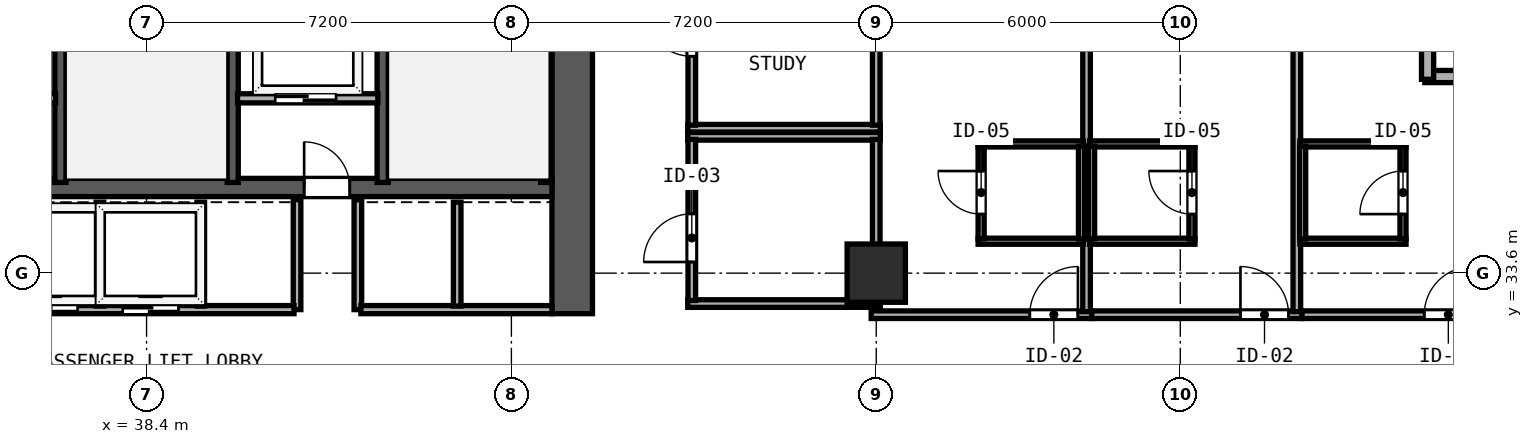
"""IFC4 building model, lengths in metres.
Left out: names, types, materials, properties, quantities, classifications, styles, units other than length and angle.
Written with IfcOpenShell. Run it as: python <this file> out.ifc"""

import sys

from ifc_helpers import new_model, si_unit, direction, frame, frame_2d, origin, origin_2d, place, context, subcontext, project, spatial, rectangle, hollow_rectangle, extrude, element, fill, save


model = new_model("IFC4")
c1 = context("Model", 3, precision=1e-05, world=origin(), true_north=direction((0.0, 1.0)))
c2 = subcontext(c1, "Body", "Model", "MODEL_VIEW")
j1 = project(units=[si_unit("LENGTHUNIT", "METRE"), si_unit("PLANEANGLEUNIT", "RADIAN")], contexts=[c1])
p1 = place(None, origin())
s1 = spatial("IfcSite", under=j1, at=p1, CompositionType="ELEMENT")
p2 = place(p1, origin())
s2 = spatial("IfcBuilding", under=s1, at=p2, CompositionType="ELEMENT")
p3 = place(p2, frame((0.0, 0.0, 81.8)))
s3 = spatial("IfcBuildingStorey", under=s2, at=p3, CompositionType="ELEMENT", Elevation=81.8)
p4 = place(p3, frame((46.8, 32.8, 0.0), z_axis=(0.0, 0.0, 1.0), x_axis=(0.0, 1.0, 0.0)))
e1 = element("IfcWall", 1, at=p4, inside=s3, PredefinedType="SHEAR", context=c2, shape_type="SweptSolid", body=[
    extrude(rectangle(XDim=10.0, YDim=0.8, at=frame_2d((5.0, 0.0))), origin(), (0.0, 0.0, 1.0), 3.6),
])
p5 = place(p3, frame((30.4, 35.29, 0.0), z_axis=(0.0, 0.0, 1.0), x_axis=(1.0, 0.0, 0.0)))
e2 = element("IfcWall", 2, at=p5, inside=s3, PredefinedType="SHEAR", context=c2, shape_type="SweptSolid", body=[
    extrude(rectangle(XDim=16.0, YDim=0.36, at=frame_2d((8.0, 0.0))), origin(), (0.0, 0.0, 1.0), 3.6),
])
p6 = place(p5, frame((4.95, 0.0, 0.0), z_axis=(0.0, 0.0, 1.0), x_axis=(-1.0, 0.0, 0.0)))
e3 = element("IfcOpeningElement", 3, at=p6, cuts=e2, PredefinedType="OPENING", context=c2, shape_type="SweptSolid", body=[
    extrude(rectangle(XDim=0.9, YDim=2.1, at=frame_2d((0.45, 1.05))), frame((0.0, 0.19, 0.0), z_axis=(0.0, -1.0, 0.0), x_axis=(1.0, 0.0, 0.0)), (0.0, 0.0, 1.0), 0.38),
])
p7 = place(p5, frame((12.01, 0.0, 0.0), z_axis=(0.0, 0.0, 1.0), x_axis=(-1.0, 0.0, 0.0)))
e4 = element("IfcOpeningElement", 4, at=p7, cuts=e2, PredefinedType="OPENING", context=c2, shape_type="SweptSolid", body=[
    extrude(rectangle(XDim=0.9, YDim=2.1, at=frame_2d((0.45, 1.05))), frame((0.0, 0.19, 0.0), z_axis=(0.0, -1.0, 0.0), x_axis=(1.0, 0.0, 0.0)), (0.0, 0.0, 1.0), 0.38),
])
for number, where, z_axis, x_axis in (
    (5, (36.7, 35.39, 0.0), (0.0, 0.0, 1.0), (0.0, 1.0, 0.0)),
    (6, (40.1, 35.39, 0.0), (0.0, 0.0, 1.0), (0.0, 1.0, 0.0)),
    (7, (43.06, 35.39, 0.0), (0.0, 0.0, 1.0), (0.0, 1.0, 0.0)),
    (8, (46.288, 35.39, 0.0), (0.0, 0.0, 1.0), (0.0, 1.0, 0.0)),
):
    element("IfcWall", number, at=place(p3, frame(where, z_axis=z_axis, x_axis=x_axis)), inside=s3, PredefinedType="SHEAR", context=c2, shape_type="SweptSolid", body=[
        extrude(rectangle(XDim=7.41, YDim=0.22, at=frame_2d((3.705, 0.0))), origin(), (0.0, 0.0, 1.0), 3.6),
    ])
p8 = place(p3, frame((52.8, 33.6, 0.0), z_axis=(0.0, 0.0, 1.0), x_axis=(1.0, 0.0, 0.0)))
e9 = element("IfcColumn", 9, at=p8, inside=s3, PredefinedType="COLUMN", context=c2, shape_type="SweptSolid", body=[
    extrude(hollow_rectangle(XDim=1.15, YDim=1.15, WallThickness=0.042, at=origin_2d()), origin(), (0.0, 0.0, 1.0), 3.8),
])
p9 = place(p3, frame((64.735, 37.48, 0.0), z_axis=(0.0, 0.0, 1.0), x_axis=(-1.0, 0.0, 0.0)))
e10 = element("IfcWall", 10, at=p9, inside=s3, PredefinedType="SOLIDWALL", context=c2, shape_type="SweptSolid", body=[
    extrude(rectangle(XDim=1.11, YDim=0.24, at=frame_2d((0.555, 0.0))), origin(), (0.0, 0.0, 1.0), 3.6),
])
p10 = place(p3, frame((63.68, 37.425, 0.0), z_axis=(0.0, 0.0, 1.0), x_axis=(0.0, 1.0, 0.0)))
e11 = element("IfcWall", 11, at=p10, inside=s3, PredefinedType="SOLIDWALL", context=c2, shape_type="SweptSolid", body=[
    extrude(rectangle(XDim=1.11, YDim=0.24, at=frame_2d((0.555, 0.0))), origin(), (0.0, 0.0, 1.0), 3.6),
])
p11 = place(p3, frame((33.835, 37.05, 0.0), z_axis=(0.0, 0.0, 1.0), x_axis=(1.0, 0.0, 0.0)))
e12 = element("IfcWall", 12, at=p11, inside=s3, PredefinedType="SOLIDWALL", context=c2, shape_type="SweptSolid", body=[
    extrude(rectangle(XDim=2.77, YDim=0.18, at=frame_2d((1.385, 0.0))), origin(), (0.0, 0.0, 1.0), 3.6),
])
p12 = place(p11, frame((1.945, 0.0, 0.0), z_axis=(0.0, 0.0, 1.0), x_axis=(-1.0, 0.0, 0.0)))
e13 = element("IfcOpeningElement", 13, at=p12, cuts=e12, PredefinedType="OPENING", context=c2, shape_type="SweptSolid", body=[
    extrude(rectangle(XDim=1.2, YDim=2.2, at=frame_2d((0.6, 1.1))), frame((0.0, 0.1, 0.0), z_axis=(0.0, -1.0, 0.0), x_axis=(1.0, 0.0, 0.0)), (0.0, 0.0, 1.0), 0.2),
])
p13 = place(p3, frame((40.195, 37.05, 0.0), z_axis=(0.0, 0.0, 1.0), x_axis=(1.0, 0.0, 0.0)))
e14 = element("IfcWall", 14, at=p13, inside=s3, PredefinedType="SOLIDWALL", context=c2, shape_type="SweptSolid", body=[
    extrude(rectangle(XDim=2.77, YDim=0.18, at=frame_2d((1.385, 0.0))), origin(), (0.0, 0.0, 1.0), 3.6),
])
p14 = place(p13, frame((1.945, 0.0, 0.0), z_axis=(0.0, 0.0, 1.0), x_axis=(-1.0, 0.0, 0.0)))
e15 = element("IfcOpeningElement", 15, at=p14, cuts=e14, PredefinedType="OPENING", context=c2, shape_type="SweptSolid", body=[
    extrude(rectangle(XDim=1.2, YDim=2.2, at=frame_2d((0.6, 1.1))), frame((0.0, 0.1, 0.0), z_axis=(0.0, -1.0, 0.0), x_axis=(1.0, 0.0, 0.0)), (0.0, 0.0, 1.0), 0.2),
])
for number, where, z_axis, x_axis in (
    (16, (41.37, 32.88, 0.0), (0.0, 0.0, 1.0), (0.0, 1.0, 0.0)),
    (17, (42.57, 32.88, 0.0), (0.0, 0.0, 1.0), (0.0, 1.0, 0.0)),
):
    element("IfcWall", number, at=place(p3, frame(where, z_axis=z_axis, x_axis=x_axis)), inside=s3, PredefinedType="SOLIDWALL", context=c2, shape_type="SweptSolid", body=[
        extrude(rectangle(XDim=2.17, YDim=0.15, at=frame_2d((1.085, 0.0))), origin(), (0.0, 0.0, 1.0), 3.6),
    ])
p15 = place(p3, frame((35.57, 32.88, 0.0), z_axis=(0.0, 0.0, 1.0), x_axis=(1.0, 0.0, 0.0)))
e18 = element("IfcWall", 18, at=p15, inside=s3, PredefinedType="SOLIDWALL", context=c2, shape_type="SweptSolid", body=[
    extrude(rectangle(XDim=5.74, YDim=0.16, at=frame_2d((2.87, 0.0))), origin(), (0.0, 0.0, 1.0), 3.6),
])
p16 = place(p15, frame((1.47, 0.0, 0.0), z_axis=(0.0, 0.0, 1.0), x_axis=(-1.0, 0.0, 0.0)))
e19 = element("IfcOpeningElement", 19, at=p16, cuts=e18, PredefinedType="OPENING", context=c2, shape_type="SweptSolid", body=[
    extrude(rectangle(XDim=1.1, YDim=2.2, at=frame_2d((0.55, 1.1))), frame((0.0, 0.09, 0.0), z_axis=(0.0, -1.0, 0.0), x_axis=(1.0, 0.0, 0.0)), (0.0, 0.0, 1.0), 0.18),
])
p17 = place(p15, frame((3.46, 0.0, 0.0), z_axis=(0.0, 0.0, 1.0), x_axis=(-1.0, 0.0, 0.0)))
e20 = element("IfcOpeningElement", 20, at=p17, cuts=e18, PredefinedType="OPENING", context=c2, shape_type="SweptSolid", body=[
    extrude(rectangle(XDim=1.1, YDim=2.2, at=frame_2d((0.55, 1.1))), frame((0.0, 0.09, 0.0), z_axis=(0.0, -1.0, 0.0), x_axis=(1.0, 0.0, 0.0)), (0.0, 0.0, 1.0), 0.18),
])
p18 = place(p3, frame((42.63, 32.88, 0.0), z_axis=(0.0, 0.0, 1.0), x_axis=(1.0, 0.0, 0.0)))
e21 = element("IfcWall", 21, at=p18, inside=s3, PredefinedType="SOLIDWALL", context=c2, shape_type="SweptSolid", body=[
    extrude(rectangle(XDim=3.77, YDim=0.16, at=frame_2d((1.885, 0.0))), origin(), (0.0, 0.0, 1.0), 3.6),
])
for number, where, z_axis, x_axis in (
    (22, (37.48, 32.95, 0.0), (0.0, 0.0, 1.0), (0.0, 1.0, 0.0)),
    (23, (39.47, 32.95, 0.0), (0.0, 0.0, 1.0), (0.0, 1.0, 0.0)),
    (24, (44.53, 32.95, 0.0), (0.0, 0.0, 1.0), (0.0, 1.0, 0.0)),
):
    element("IfcWall", number, at=place(p3, frame(where, z_axis=z_axis, x_axis=x_axis)), inside=s3, PredefinedType="SOLIDWALL", context=c2, shape_type="SweptSolid", body=[
        extrude(rectangle(XDim=2.05, YDim=0.15, at=frame_2d((1.025, 0.0))), origin(), (0.0, 0.0, 1.0), 3.6),
    ])
for number, where, z_axis, x_axis in (
    (25, (49.08, 36.3, 0.0), (0.0, 0.0, 1.0), (1.0, 0.0, 0.0)),
    (26, (49.08, 33.0, 0.0), (0.0, 0.0, 1.0), (1.0, 0.0, 0.0)),
):
    element("IfcWall", number, at=place(p3, frame(where, z_axis=z_axis, x_axis=x_axis)), inside=s3, PredefinedType="PARTITIONING", context=c2, shape_type="SweptSolid", body=[
        extrude(rectangle(XDim=3.8, YDim=0.15, at=frame_2d((1.9, 0.0))), origin(), (0.0, 0.0, 1.0), 3.6),
    ])
p19 = place(p3, frame((49.16, 33.06, 0.0), z_axis=(0.0, 0.0, 1.0), x_axis=(0.0, 1.0, 0.0)))
e27 = element("IfcWall", 27, at=p19, inside=s3, PredefinedType="PARTITIONING", context=c2, shape_type="SweptSolid", body=[
    extrude(rectangle(XDim=3.18, YDim=0.15, at=frame_2d((1.59, 0.0))), origin(), (0.0, 0.0, 1.0), 3.6),
])
p20 = place(p19, frame((0.76, 0.0, 0.0)))
e28 = element("IfcOpeningElement", 28, at=p20, cuts=e27, PredefinedType="OPENING", context=c2, shape_type="SweptSolid", body=[
    extrude(rectangle(XDim=0.95, YDim=2.12, at=frame_2d((0.475, 1.06))), frame((0.0, 0.085, 0.0), z_axis=(0.0, -1.0, 0.0), x_axis=(1.0, 0.0, 0.0)), (0.0, 0.0, 1.0), 0.17),
])
p21 = place(p3, frame((52.8, 33.06, 0.0), z_axis=(0.0, 0.0, 1.0), x_axis=(0.0, 1.0, 0.0)))
e29 = element("IfcWall", 29, at=p21, inside=s3, PredefinedType="PARTITIONING", context=c2, shape_type="SweptSolid", body=[
    extrude(rectangle(XDim=3.18, YDim=0.15, at=frame_2d((1.59, 0.0))), origin(), (0.0, 0.0, 1.0), 3.097),
])
p22 = place(p3, frame((49.08, 36.46, 0.0), z_axis=(0.0, 0.0, 1.0), x_axis=(1.0, 0.0, 0.0)))
e30 = element("IfcWall", 30, at=p22, inside=s3, PredefinedType="PARTITIONING", context=c2, shape_type="SweptSolid", body=[
    extrude(rectangle(XDim=3.8, YDim=0.15, at=frame_2d((1.9, 0.0))), origin(), (0.0, 0.0, 1.0), 3.6),
])
p23 = place(p3, frame((49.16, 36.52, 0.0), z_axis=(0.0, 0.0, 1.0), x_axis=(0.0, 1.0, 0.0)))
e31 = element("IfcWall", 31, at=p23, inside=s3, PredefinedType="PARTITIONING", context=c2, shape_type="SweptSolid", body=[
    extrude(rectangle(XDim=4.62, YDim=0.15, at=frame_2d((2.31, 0.0))), origin(), (0.0, 0.0, 1.0), 3.6),
])
p24 = place(p23, frame((1.36, 0.0, 0.0)))
e32 = element("IfcOpeningElement", 32, at=p24, cuts=e31, PredefinedType="OPENING", context=c2, shape_type="SweptSolid", body=[
    extrude(rectangle(XDim=0.95, YDim=2.12, at=frame_2d((0.475, 1.06))), frame((0.0, 0.085, 0.0), z_axis=(0.0, -1.0, 0.0), x_axis=(1.0, 0.0, 0.0)), (0.0, 0.0, 1.0), 0.17),
])
p25 = place(p3, frame((52.8, 36.52, 0.0), z_axis=(0.0, 0.0, 1.0), x_axis=(0.0, 1.0, 0.0)))
e33 = element("IfcWall", 33, at=p25, inside=s3, PredefinedType="PARTITIONING", context=c2, shape_type="SweptSolid", body=[
    extrude(rectangle(XDim=4.62, YDim=0.15, at=frame_2d((2.31, 0.0))), origin(), (0.0, 0.0, 1.0), 3.097),
])
p26 = place(p3, frame((52.7, 32.78, 0.0), z_axis=(0.0, 0.0, 1.0), x_axis=(1.0, 0.0, 0.0)))
e34 = element("IfcWall", 34, at=p26, inside=s3, PredefinedType="PARTITIONING", context=c2, shape_type="SweptSolid", body=[
    extrude(rectangle(XDim=4.35, YDim=0.15, at=frame_2d((2.175, 0.0))), origin(), (0.0, 0.0, 1.0), 3.6),
])
p27 = place(p26, frame((3.13, 0.0, 0.0)))
e35 = element("IfcOpeningElement", 35, at=p27, cuts=e34, PredefinedType="OPENING", context=c2, shape_type="SweptSolid", body=[
    extrude(rectangle(XDim=0.95, YDim=2.15, at=frame_2d((0.475, 1.075))), frame((0.0, 0.085, 0.0), z_axis=(0.0, -1.0, 0.0), x_axis=(1.0, 0.0, 0.0)), (0.0, 0.0, 1.0), 0.17),
])
p28 = place(p3, frame((56.95, 32.84, 0.0), z_axis=(0.0, 0.0, 1.0), x_axis=(0.0, 1.0, 0.0)))
e36 = element("IfcWall", 36, at=p28, inside=s3, PredefinedType="PARTITIONING", context=c2, shape_type="SweptSolid", body=[
    extrude(rectangle(XDim=9.939, YDim=0.15, at=frame_2d((4.97, 0.0))), origin(), (0.0, 0.0, 1.0), 3.6),
])
for number, where, z_axis, x_axis in (
    (37, (54.81, 36.15, 0.0), (0.0, 0.0, 1.0), (1.0, 0.0, 0.0)),
    (38, (54.81, 34.23, 0.0), (0.0, 0.0, 1.0), (1.0, 0.0, 0.0)),
):
    element("IfcWall", number, at=place(p3, frame(where, z_axis=z_axis, x_axis=x_axis)), inside=s3, PredefinedType="PARTITIONING", context=c2, shape_type="SweptSolid", body=[
        extrude(rectangle(XDim=2.08, YDim=0.12, at=frame_2d((1.04, 0.0))), origin(), (0.0, 0.0, 1.0), 3.6),
    ])
p29 = place(p3, frame((54.87, 34.275, 0.0), z_axis=(0.0, 0.0, 1.0), x_axis=(0.0, 1.0, 0.0)))
e39 = element("IfcWall", 39, at=p29, inside=s3, PredefinedType="PARTITIONING", context=c2, shape_type="SweptSolid", body=[
    extrude(rectangle(XDim=1.83, YDim=0.12, at=frame_2d((0.915, 0.0))), origin(), (0.0, 0.0, 1.0), 3.6),
])
p30 = place(p29, frame((1.34, 0.0, 0.0), z_axis=(0.0, 0.0, 1.0), x_axis=(-1.0, 0.0, 0.0)))
e40 = element("IfcOpeningElement", 40, at=p30, cuts=e39, PredefinedType="OPENING", context=c2, shape_type="SweptSolid", body=[
    extrude(rectangle(XDim=0.85, YDim=2.1, at=frame_2d((0.425, 1.05))), frame((0.0, 0.07, 0.0), z_axis=(0.0, -1.0, 0.0), x_axis=(1.0, 0.0, 0.0)), (0.0, 0.0, 1.0), 0.14),
])
p31 = place(p3, frame((56.85, 34.275, 0.0), z_axis=(0.0, 0.0, 1.0), x_axis=(0.0, 1.0, 0.0)))
e41 = element("IfcWall", 41, at=p31, inside=s3, PredefinedType="PARTITIONING", context=c2, shape_type="SweptSolid", body=[
    extrude(rectangle(XDim=1.83, YDim=0.12, at=frame_2d((0.915, 0.0))), origin(), (0.0, 0.0, 1.0), 3.6),
])
p32 = place(p3, frame((57.052, 32.78, 0.0), z_axis=(0.0, 0.0, 1.0), x_axis=(1.0, 0.0, 0.0)))
e42 = element("IfcWall", 42, at=p32, inside=s3, PredefinedType="PARTITIONING", context=c2, shape_type="SweptSolid", body=[
    extrude(rectangle(XDim=4.148, YDim=0.15, at=frame_2d((2.074, 0.0))), origin(), (0.0, 0.0, 1.0), 3.6),
])
p33 = place(p32, frame((2.935, 0.0, 0.0)))
e43 = element("IfcOpeningElement", 43, at=p33, cuts=e42, PredefinedType="OPENING", context=c2, shape_type="SweptSolid", body=[
    extrude(rectangle(XDim=0.95, YDim=2.15, at=frame_2d((0.475, 1.075))), frame((0.0, 0.085, 0.0), z_axis=(0.0, -1.0, 0.0), x_axis=(1.0, 0.0, 0.0)), (0.0, 0.0, 1.0), 0.17),
])
p34 = place(p3, frame((61.1, 32.84, 0.0), z_axis=(0.0, 0.0, 1.0), x_axis=(0.0, 1.0, 0.0)))
e44 = element("IfcWall", 44, at=p34, inside=s3, PredefinedType="PARTITIONING", context=c2, shape_type="SweptSolid", body=[
    extrude(rectangle(XDim=7.921, YDim=0.15, at=frame_2d((3.96, 0.0))), origin(), (0.0, 0.0, 1.0), 3.6),
])
for number, where, z_axis, x_axis in (
    (45, (57.01, 36.15, 0.0), (0.0, 0.0, 1.0), (1.0, 0.0, 0.0)),
    (46, (57.01, 34.23, 0.0), (0.0, 0.0, 1.0), (1.0, 0.0, 0.0)),
):
    element("IfcWall", number, at=place(p3, frame(where, z_axis=z_axis, x_axis=x_axis)), inside=s3, PredefinedType="PARTITIONING", context=c2, shape_type="SweptSolid", body=[
        extrude(rectangle(XDim=2.08, YDim=0.12, at=frame_2d((1.04, 0.0))), origin(), (0.0, 0.0, 1.0), 3.6),
    ])
p35 = place(p3, frame((57.05, 34.275, 0.0), z_axis=(0.0, 0.0, 1.0), x_axis=(0.0, 1.0, 0.0)))
e47 = element("IfcWall", 47, at=p35, inside=s3, PredefinedType="PARTITIONING", context=c2, shape_type="SweptSolid", body=[
    extrude(rectangle(XDim=1.83, YDim=0.12, at=frame_2d((0.915, 0.0))), origin(), (0.0, 0.0, 1.0), 3.6),
])
p36 = place(p3, frame((59.03, 34.275, 0.0), z_axis=(0.0, 0.0, 1.0), x_axis=(0.0, 1.0, 0.0)))
e48 = element("IfcWall", 48, at=p36, inside=s3, PredefinedType="PARTITIONING", context=c2, shape_type="SweptSolid", body=[
    extrude(rectangle(XDim=1.83, YDim=0.12, at=frame_2d((0.915, 0.0))), origin(), (0.0, 0.0, 1.0), 3.6),
])
p37 = place(p36, frame((0.49, 0.0, 0.0)))
e49 = element("IfcOpeningElement", 49, at=p37, cuts=e48, PredefinedType="OPENING", context=c2, shape_type="SweptSolid", body=[
    extrude(rectangle(XDim=0.85, YDim=2.1, at=frame_2d((0.425, 1.05))), frame((0.0, 0.07, 0.0), z_axis=(0.0, -1.0, 0.0), x_axis=(1.0, 0.0, 0.0)), (0.0, 0.0, 1.0), 0.14),
])
p38 = place(p3, frame((61.202, 32.78, 0.0), z_axis=(0.0, 0.0, 1.0), x_axis=(1.0, 0.0, 0.0)))
e50 = element("IfcWall", 50, at=p38, inside=s3, PredefinedType="PARTITIONING", context=c2, shape_type="SweptSolid", body=[
    extrude(rectangle(XDim=3.898, YDim=0.15, at=frame_2d((1.949, 0.0))), origin(), (0.0, 0.0, 1.0), 3.6),
])
p39 = place(p38, frame((2.413, 0.0, 0.0)))
e51 = element("IfcOpeningElement", 51, at=p39, cuts=e50, PredefinedType="OPENING", context=c2, shape_type="SweptSolid", body=[
    extrude(rectangle(XDim=0.95, YDim=2.15, at=frame_2d((0.475, 1.075))), frame((0.0, 0.085, 0.0), z_axis=(0.0, -1.0, 0.0), x_axis=(1.0, 0.0, 0.0)), (0.0, 0.0, 1.0), 0.17),
])
for number, where, z_axis, x_axis in (
    (52, (61.16, 36.15, 0.0), (0.0, 0.0, 1.0), (1.0, 0.0, 0.0)),
    (53, (61.16, 34.23, 0.0), (0.0, 0.0, 1.0), (1.0, 0.0, 0.0)),
):
    element("IfcWall", number, at=place(p3, frame(where, z_axis=z_axis, x_axis=x_axis)), inside=s3, PredefinedType="PARTITIONING", context=c2, shape_type="SweptSolid", body=[
        extrude(rectangle(XDim=2.095, YDim=0.12, at=frame_2d((1.047, 0.0))), origin(), (0.0, 0.0, 1.0), 3.6),
    ])
p40 = place(p3, frame((61.215, 34.275, 0.0), z_axis=(0.0, 0.0, 1.0), x_axis=(0.0, 1.0, 0.0)))
e54 = element("IfcWall", 54, at=p40, inside=s3, PredefinedType="PARTITIONING", context=c2, shape_type="SweptSolid", body=[
    extrude(rectangle(XDim=1.83, YDim=0.12, at=frame_2d((0.915, 0.0))), origin(), (0.0, 0.0, 1.0), 3.6),
])
p41 = place(p3, frame((63.195, 34.275, 0.0), z_axis=(0.0, 0.0, 1.0), x_axis=(0.0, 1.0, 0.0)))
e55 = element("IfcWall", 55, at=p41, inside=s3, PredefinedType="PARTITIONING", context=c2, shape_type="SweptSolid", body=[
    extrude(rectangle(XDim=1.83, YDim=0.12, at=frame_2d((0.915, 0.0))), origin(), (0.0, 0.0, 1.0), 3.6),
])
p42 = place(p41, frame((0.49, 0.0, 0.0)))
e56 = element("IfcOpeningElement", 56, at=p42, cuts=e55, PredefinedType="OPENING", context=c2, shape_type="SweptSolid", body=[
    extrude(rectangle(XDim=0.85, YDim=2.1, at=frame_2d((0.425, 1.05))), frame((0.0, 0.07, 0.0), z_axis=(0.0, -1.0, 0.0), x_axis=(1.0, 0.0, 0.0)), (0.0, 0.0, 1.0), 0.14),
])
p43 = place(p14, origin())
e57 = element("IfcDoor", 57, at=p43, inside=s3, OperationType="SLIDING_TO_RIGHT", PredefinedType="DOOR", context=c2, shape_type="SweptSolid", body=[
    extrude(rectangle(XDim=1.2, YDim=2.2, at=frame_2d((0.6, 1.1))), frame((0.0, 0.025, 0.0), z_axis=(0.0, -1.0, 0.0), x_axis=(1.0, 0.0, 0.0)), (0.0, 0.0, 1.0), 0.05),
])
fill(e15, e57)
p44 = place(p7, origin())
e58 = element("IfcDoor", 58, at=p44, inside=s3, OperationType="SINGLE_SWING_RIGHT", PredefinedType="DOOR", context=c2, shape_type="SweptSolid", body=[
    extrude(rectangle(XDim=0.9, YDim=2.1, at=frame_2d((0.45, 1.05))), frame((0.0, 0.025, 0.0), z_axis=(0.0, -1.0, 0.0), x_axis=(1.0, 0.0, 0.0)), (0.0, 0.0, 1.0), 0.05),
])
fill(e4, e58)
p45 = place(p16, origin())
e59 = element("IfcDoor", 59, at=p45, inside=s3, OperationType="SLIDING_TO_LEFT", PredefinedType="DOOR", context=c2, shape_type="SweptSolid", body=[
    extrude(rectangle(XDim=1.1, YDim=2.2, at=frame_2d((0.55, 1.1))), frame((0.0, 0.025, 0.0), z_axis=(0.0, -1.0, 0.0), x_axis=(1.0, 0.0, 0.0)), (0.0, 0.0, 1.0), 0.05),
])
fill(e19, e59)
p46 = place(p17, origin())
e60 = element("IfcDoor", 60, at=p46, inside=s3, OperationType="SLIDING_TO_LEFT", PredefinedType="DOOR", context=c2, shape_type="SweptSolid", body=[
    extrude(rectangle(XDim=1.1, YDim=2.2, at=frame_2d((0.55, 1.1))), frame((0.0, 0.025, 0.0), z_axis=(0.0, -1.0, 0.0), x_axis=(1.0, 0.0, 0.0)), (0.0, 0.0, 1.0), 0.05),
])
fill(e20, e60)
p47 = place(p20, origin())
e61 = element("IfcDoor", 61, at=p47, inside=s3, OperationType="SINGLE_SWING_LEFT", PredefinedType="DOOR", context=c2, shape_type="SweptSolid", body=[
    extrude(rectangle(XDim=0.95, YDim=2.12, at=frame_2d((0.475, 1.06))), frame((0.0, 0.025, 0.0), z_axis=(0.0, -1.0, 0.0), x_axis=(1.0, 0.0, 0.0)), (0.0, 0.0, 1.0), 0.05),
])
fill(e28, e61)
p48 = place(p24, origin())
e62 = element("IfcDoor", 62, at=p48, inside=s3, OperationType="SINGLE_SWING_RIGHT", PredefinedType="DOOR", context=c2, shape_type="SweptSolid", body=[
    extrude(rectangle(XDim=0.95, YDim=2.12, at=frame_2d((0.475, 1.06))), frame((0.0, 0.025, 0.0), z_axis=(0.0, -1.0, 0.0), x_axis=(1.0, 0.0, 0.0)), (0.0, 0.0, 1.0), 0.05),
])
fill(e32, e62)
p49 = place(p27, origin())
e63 = element("IfcDoor", 63, at=p49, inside=s3, OperationType="SINGLE_SWING_RIGHT", PredefinedType="DOOR", context=c2, shape_type="SweptSolid", body=[
    extrude(rectangle(XDim=0.95, YDim=2.15, at=frame_2d((0.475, 1.075))), frame((0.0, 0.025, 0.0), z_axis=(0.0, -1.0, 0.0), x_axis=(1.0, 0.0, 0.0)), (0.0, 0.0, 1.0), 0.05),
])
fill(e35, e63)
p50 = place(p30, origin())
e64 = element("IfcDoor", 64, at=p50, inside=s3, OperationType="SINGLE_SWING_LEFT", PredefinedType="DOOR", context=c2, shape_type="SweptSolid", body=[
    extrude(rectangle(XDim=0.85, YDim=2.1, at=frame_2d((0.425, 1.05))), frame((0.0, 0.025, 0.0), z_axis=(0.0, -1.0, 0.0), x_axis=(1.0, 0.0, 0.0)), (0.0, 0.0, 1.0), 0.05),
])
fill(e40, e64)
p51 = place(p33, origin())
e65 = element("IfcDoor", 65, at=p51, inside=s3, OperationType="SINGLE_SWING_LEFT", PredefinedType="DOOR", context=c2, shape_type="SweptSolid", body=[
    extrude(rectangle(XDim=0.95, YDim=2.15, at=frame_2d((0.475, 1.075))), frame((0.0, 0.025, 0.0), z_axis=(0.0, -1.0, 0.0), x_axis=(1.0, 0.0, 0.0)), (0.0, 0.0, 1.0), 0.05),
])
fill(e43, e65)
p52 = place(p37, origin())
e66 = element("IfcDoor", 66, at=p52, inside=s3, OperationType="SINGLE_SWING_RIGHT", PredefinedType="DOOR", context=c2, shape_type="SweptSolid", body=[
    extrude(rectangle(XDim=0.85, YDim=2.1, at=frame_2d((0.425, 1.05))), frame((0.0, 0.025, 0.0), z_axis=(0.0, -1.0, 0.0), x_axis=(1.0, 0.0, 0.0)), (0.0, 0.0, 1.0), 0.05),
])
fill(e49, e66)
p53 = place(p39, origin())
e67 = element("IfcDoor", 67, at=p53, inside=s3, OperationType="SINGLE_SWING_RIGHT", PredefinedType="DOOR", context=c2, shape_type="SweptSolid", body=[
    extrude(rectangle(XDim=0.95, YDim=2.15, at=frame_2d((0.475, 1.075))), frame((0.0, 0.025, 0.0), z_axis=(0.0, -1.0, 0.0), x_axis=(1.0, 0.0, 0.0)), (0.0, 0.0, 1.0), 0.05),
])
fill(e51, e67)
p54 = place(p42, origin())
e68 = element("IfcDoor", 68, at=p54, inside=s3, OperationType="SINGLE_SWING_LEFT", PredefinedType="DOOR", context=c2, shape_type="SweptSolid", body=[
    extrude(rectangle(XDim=0.85, YDim=2.1, at=frame_2d((0.425, 1.05))), frame((0.0, 0.025, 0.0), z_axis=(0.0, -1.0, 0.0), x_axis=(1.0, 0.0, 0.0)), (0.0, 0.0, 1.0), 0.05),
])
fill(e56, e68)
save(model, sys.argv[1])
